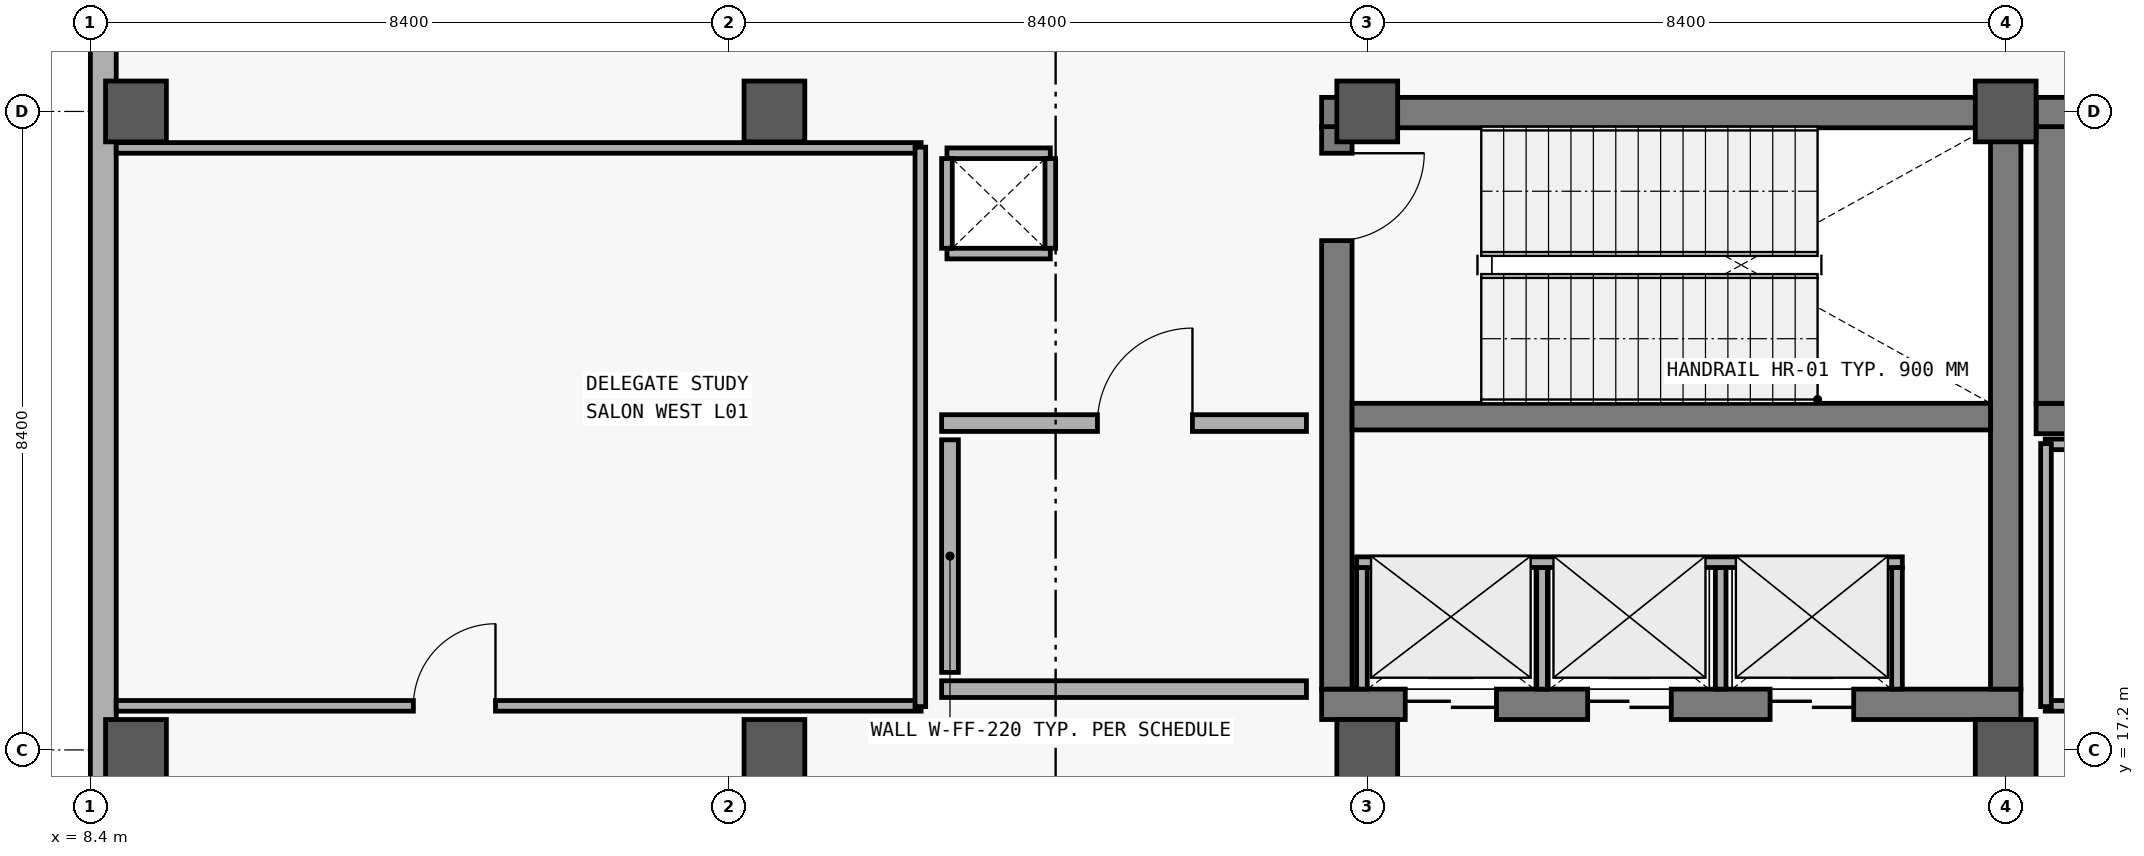
"""IFC4 building model, lengths in metres.
Left out: names, types, materials, properties, quantities, classifications, styles, units other than length and angle.
Written with IfcOpenShell. Run it as: python <this file> out.ifc"""

import sys

from ifc_helpers import new_model, si_unit, direction, frame, frame_2d, origin, origin_2d, place, context, subcontext, project, spatial, rectangle, extrude, element, fill, save


model = new_model("IFC4")
c1 = context("Model", 3, precision=1e-05, world=origin(), true_north=direction((0.0, 1.0)))
c2 = subcontext(c1, "Body", "Model", "MODEL_VIEW")
j1 = project(units=[si_unit("LENGTHUNIT", "METRE"), si_unit("PLANEANGLEUNIT", "RADIAN")], contexts=[c1])
p1 = place(None, origin())
s1 = spatial("IfcSite", under=j1, at=p1, CompositionType="ELEMENT")
p2 = place(p1, origin())
s2 = spatial("IfcBuilding", under=s1, at=p2, CompositionType="ELEMENT")
p3 = place(p2, frame((0.0, 0.0, 5.4)))
s3 = spatial("IfcBuildingStorey", under=s2, at=p3, CompositionType="ELEMENT", Elevation=5.4)
for number, where, z_axis, x_axis in (
    (1, (9.0, 17.2, 0.0), (0.0, 0.0, 1.0), (1.0, 0.0, 0.0)),
    (2, (9.0, 25.6, 0.0), (0.0, 0.0, 1.0), (1.0, 0.0, 0.0)),
    (3, (17.4, 17.2, 0.0), (0.0, 0.0, 1.0), (1.0, 0.0, 0.0)),
    (4, (17.4, 25.6, 0.0), (0.0, 0.0, 1.0), (1.0, 0.0, 0.0)),
    (5, (25.2, 17.2, 0.0), (0.0, 0.0, 1.0), (1.0, 0.0, 0.0)),
    (6, (25.2, 25.6, 0.0), (0.0, 0.0, 1.0), (1.0, 0.0, 0.0)),
    (7, (33.6, 17.2, 0.0), (0.0, 0.0, 1.0), (1.0, 0.0, 0.0)),
    (8, (33.6, 25.6, 0.0), (0.0, 0.0, 1.0), (1.0, 0.0, 0.0)),
):
    element("IfcColumn", number, at=place(p3, frame(where, z_axis=z_axis, x_axis=x_axis)), inside=s3, PredefinedType="COLUMN", context=c2, shape_type="SweptSolid", body=[
        extrude(rectangle(XDim=0.8, YDim=0.8, at=origin_2d()), origin(), (0.0, 0.0, 1.0), 5.4),
    ])
p4 = place(p3, frame((8.57, 6.0, 0.0), z_axis=(0.0, 0.0, 1.0), x_axis=(0.0, 1.0, 0.0)))
e9 = element("IfcWall", 9, at=p4, inside=s3, PredefinedType="SOLIDWALL", context=c2, shape_type="SweptSolid", body=[
    extrude(rectangle(XDim=28.0, YDim=0.34, at=frame_2d((14.0, 0.0))), origin(), (0.0, 0.0, 1.0), 5.1),
])
p5 = place(p4, frame((4.5, 0.0, 0.95)))
e10 = element("IfcOpeningElement", 10, at=p5, cuts=e9, PredefinedType="OPENING", context=c2, shape_type="SweptSolid", body=[
    extrude(rectangle(XDim=1.6, YDim=1.6, at=frame_2d((0.8, 0.8))), frame((0.0, 0.18, 0.0), z_axis=(0.0, -1.0, 0.0), x_axis=(1.0, 0.0, 0.0)), (0.0, 0.0, 1.0), 0.36),
])
p6 = place(p3, frame((24.6, 17.8, 0.0), z_axis=(0.0, 0.0, 1.0), x_axis=(1.0, 0.0, 0.0)))
e11 = element("IfcWall", 11, at=p6, inside=s3, PredefinedType="SHEAR", context=c2, shape_type="SweptSolid", body=[
    extrude(rectangle(XDim=9.2, YDim=0.4, at=frame_2d((4.6, 0.0))), origin(), (0.0, 0.0, 1.0), 5.08),
])
p7 = place(p6, frame((1.1, 0.0, 0.0)))
e12 = element("IfcOpeningElement", 12, at=p7, cuts=e11, PredefinedType="OPENING", context=c2, shape_type="SweptSolid", body=[
    extrude(rectangle(XDim=1.2, YDim=2.2, at=frame_2d((0.6, 1.1))), frame((0.0, 0.21, 0.0), z_axis=(0.0, -1.0, 0.0), x_axis=(1.0, 0.0, 0.0)), (0.0, 0.0, 1.0), 0.42),
])
p8 = place(p6, frame((3.5, 0.0, 0.0)))
e13 = element("IfcOpeningElement", 13, at=p8, cuts=e11, PredefinedType="OPENING", context=c2, shape_type="SweptSolid", body=[
    extrude(rectangle(XDim=1.1, YDim=2.2, at=frame_2d((0.55, 1.1))), frame((0.0, 0.21, 0.0), z_axis=(0.0, -1.0, 0.0), x_axis=(1.0, 0.0, 0.0)), (0.0, 0.0, 1.0), 0.42),
])
p9 = place(p6, frame((5.9, 0.0, 0.0)))
e14 = element("IfcOpeningElement", 14, at=p9, cuts=e11, PredefinedType="OPENING", context=c2, shape_type="SweptSolid", body=[
    extrude(rectangle(XDim=1.1, YDim=2.2, at=frame_2d((0.55, 1.1))), frame((0.0, 0.21, 0.0), z_axis=(0.0, -1.0, 0.0), x_axis=(1.0, 0.0, 0.0)), (0.0, 0.0, 1.0), 0.42),
])
p10 = place(p3, frame((33.8, 25.585, 0.0), z_axis=(0.0, 0.0, 1.0), x_axis=(-1.0, 0.0, 0.0)))
e15 = element("IfcWall", 15, at=p10, inside=s3, PredefinedType="SHEAR", context=c2, shape_type="SweptSolid", body=[
    extrude(rectangle(XDim=9.2, YDim=0.4, at=frame_2d((4.6, 0.0))), origin(), (0.0, 0.0, 1.0), 5.08),
])
p11 = place(p3, frame((24.8, 25.4, 0.0), z_axis=(0.0, 0.0, 1.0), x_axis=(0.0, -1.0, 0.0)))
e16 = element("IfcWall", 16, at=p11, inside=s3, PredefinedType="SHEAR", context=c2, shape_type="SweptSolid", body=[
    extrude(rectangle(XDim=7.4, YDim=0.4, at=frame_2d((3.7, 0.0))), origin(), (0.0, 0.0, 1.0), 5.08),
])
p12 = place(p11, frame((0.35, 0.0, 0.0)))
e17 = element("IfcOpeningElement", 17, at=p12, cuts=e16, PredefinedType="OPENING", context=c2, shape_type="SweptSolid", body=[
    extrude(rectangle(XDim=1.15, YDim=2.2, at=frame_2d((0.575, 1.1))), frame((0.0, 0.21, 0.0), z_axis=(0.0, -1.0, 0.0), x_axis=(1.0, 0.0, 0.0)), (0.0, 0.0, 1.0), 0.42),
])
p13 = place(p3, frame((33.6, 18.0, 0.0), z_axis=(0.0, 0.0, 1.0), x_axis=(0.0, 1.0, 0.0)))
e18 = element("IfcWall", 18, at=p13, inside=s3, PredefinedType="SHEAR", context=c2, shape_type="SweptSolid", body=[
    extrude(rectangle(XDim=7.4, YDim=0.4, at=frame_2d((3.7, 0.0))), origin(), (0.0, 0.0, 1.0), 5.08),
])
p14 = place(p3, frame((25.0, 21.585, 0.0), z_axis=(0.0, 0.0, 1.0), x_axis=(1.0, 0.0, 0.0)))
e19 = element("IfcWall", 19, at=p14, inside=s3, PredefinedType="SHEAR", context=c2, shape_type="SweptSolid", body=[
    extrude(rectangle(XDim=8.4, YDim=0.35, at=frame_2d((4.2, 0.0))), origin(), (0.0, 0.0, 1.0), 5.08),
])
for number, where, z_axis, x_axis in (
    (20, (25.13, 18.0, 0.0), (0.0, 0.0, 1.0), (0.0, 1.0, 0.0)),
    (21, (27.5, 18.0, 0.0), (0.0, 0.0, 1.0), (0.0, 1.0, 0.0)),
    (22, (29.85, 18.0, 0.0), (0.0, 0.0, 1.0), (0.0, 1.0, 0.0)),
    (23, (32.17, 18.0, 0.0), (0.0, 0.0, 1.0), (0.0, 1.0, 0.0)),
):
    element("IfcWall", number, at=place(p3, frame(where, z_axis=z_axis, x_axis=x_axis)), inside=s3, PredefinedType="PARTITIONING", context=c2, shape_type="SweptSolid", body=[
        extrude(rectangle(XDim=1.6, YDim=0.14, at=frame_2d((0.8, 0.0))), origin(), (0.0, 0.0, 1.0), 4.23),
    ])
p15 = place(p3, frame((25.06, 19.67, 0.0), z_axis=(0.0, 0.0, 1.0), x_axis=(1.0, 0.0, 0.0)))
e24 = element("IfcWall", 24, at=p15, inside=s3, PredefinedType="PARTITIONING", context=c2, shape_type="SweptSolid", body=[
    extrude(rectangle(XDim=7.18, YDim=0.14, at=frame_2d((3.59, 0.0))), origin(), (0.0, 0.0, 1.0), 4.23),
])
p16 = place(p3, frame((19.6, 18.0, 0.0), z_axis=(0.0, 0.0, 1.0), x_axis=(1.0, 0.0, 0.0)))
e25 = element("IfcWall", 25, at=p16, inside=s3, PredefinedType="SOLIDWALL", context=c2, shape_type="SweptSolid", body=[
    extrude(rectangle(XDim=4.8, YDim=0.22, at=frame_2d((2.4, 0.0))), origin(), (0.0, 0.0, 1.0), 4.23),
])
p17 = place(p3, frame((19.6, 21.5, 0.0), z_axis=(0.0, 0.0, 1.0), x_axis=(1.0, 0.0, 0.0)))
e26 = element("IfcWall", 26, at=p17, inside=s3, PredefinedType="SOLIDWALL", context=c2, shape_type="SweptSolid", body=[
    extrude(rectangle(XDim=4.8, YDim=0.22, at=frame_2d((2.4, 0.0))), origin(), (0.0, 0.0, 1.0), 4.23),
])
p18 = place(p17, frame((2.05, 0.0, 0.0)))
e27 = element("IfcOpeningElement", 27, at=p18, cuts=e26, PredefinedType="OPENING", context=c2, shape_type="SweptSolid", body=[
    extrude(rectangle(XDim=1.25, YDim=2.2, at=frame_2d((0.625, 1.1))), frame((0.0, 0.12, 0.0), z_axis=(0.0, -1.0, 0.0), x_axis=(1.0, 0.0, 0.0)), (0.0, 0.0, 1.0), 0.24),
])
p19 = place(p3, frame((19.71, 18.22, 0.0), z_axis=(0.0, 0.0, 1.0), x_axis=(0.0, 1.0, 0.0)))
e28 = element("IfcWall", 28, at=p19, inside=s3, PredefinedType="SOLIDWALL", context=c2, shape_type="SweptSolid", body=[
    extrude(rectangle(XDim=3.06, YDim=0.22, at=frame_2d((1.53, 0.0))), origin(), (0.0, 0.0, 1.0), 4.23),
])
for number, where, z_axis, x_axis in (
    (29, (34.0, 21.56, 0.0), (0.0, 0.0, 1.0), (1.0, 0.0, 0.0)),
    (30, (43.1, 25.585, 0.0), (0.0, 0.0, 1.0), (-1.0, 0.0, 0.0)),
):
    element("IfcWall", number, at=place(p3, frame(where, z_axis=z_axis, x_axis=x_axis)), inside=s3, PredefinedType="SHEAR", context=c2, shape_type="SweptSolid", body=[
        extrude(rectangle(XDim=9.1, YDim=0.4, at=frame_2d((4.55, 0.0))), origin(), (0.0, 0.0, 1.0), 5.08),
    ])
p20 = place(p3, frame((34.2, 25.4, 0.0), z_axis=(0.0, 0.0, 1.0), x_axis=(0.0, -1.0, 0.0)))
e31 = element("IfcWall", 31, at=p20, inside=s3, PredefinedType="SHEAR", context=c2, shape_type="SweptSolid", body=[
    extrude(rectangle(XDim=3.64, YDim=0.4, at=frame_2d((1.82, 0.0))), origin(), (0.0, 0.0, 1.0), 5.08),
])
p21 = place(p3, frame((8.74, 17.78, 0.0), z_axis=(0.0, 0.0, 1.0), x_axis=(1.0, 0.0, 0.0)))
e32 = element("IfcWall", 32, at=p21, inside=s3, PredefinedType="PARTITIONING", context=c2, shape_type="SweptSolid", body=[
    extrude(rectangle(XDim=10.59, YDim=0.14, at=frame_2d((5.295, 0.0))), origin(), (0.0, 0.0, 1.0), 4.18),
])
p22 = place(p21, frame((3.91, 0.0, 0.0)))
e33 = element("IfcOpeningElement", 33, at=p22, cuts=e32, PredefinedType="OPENING", context=c2, shape_type="SweptSolid", body=[
    extrude(rectangle(XDim=1.08, YDim=2.25, at=frame_2d((0.54, 1.125))), frame((0.0, 0.08, 0.0), z_axis=(0.0, -1.0, 0.0), x_axis=(1.0, 0.0, 0.0)), (0.0, 0.0, 1.0), 0.16),
])
for number, where, z_axis, x_axis in (
    (34, (34.12, 17.78, 0.0), (0.0, 0.0, 1.0), (1.0, 0.0, 0.0)),
    (35, (34.12, 21.22, 0.0), (0.0, 0.0, 1.0), (1.0, 0.0, 0.0)),
):
    element("IfcWall", number, at=place(p3, frame(where, z_axis=z_axis, x_axis=x_axis)), inside=s3, PredefinedType="PARTITIONING", context=c2, shape_type="SweptSolid", body=[
        extrude(rectangle(XDim=10.76, YDim=0.14, at=frame_2d((5.38, 0.0))), origin(), (0.0, 0.0, 1.0), 4.18),
    ])
p23 = place(p3, frame((34.13, 17.77, 0.0), z_axis=(0.0, 0.0, 1.0), x_axis=(0.0, 1.0, 0.0)))
e36 = element("IfcWall", 36, at=p23, inside=s3, PredefinedType="PARTITIONING", context=c2, shape_type="SweptSolid", body=[
    extrude(rectangle(XDim=3.46, YDim=0.14, at=frame_2d((1.73, 0.0))), origin(), (0.0, 0.0, 1.0), 4.18),
])
p24 = place(p3, frame((8.74, 25.12, 0.0), z_axis=(0.0, 0.0, 1.0), x_axis=(1.0, 0.0, 0.0)))
e37 = element("IfcWall", 37, at=p24, inside=s3, PredefinedType="PARTITIONING", context=c2, shape_type="SweptSolid", body=[
    extrude(rectangle(XDim=10.59, YDim=0.14, at=frame_2d((5.295, 0.0))), origin(), (0.0, 0.0, 1.0), 4.18),
])
p25 = place(p3, frame((19.32, 17.77, 0.0), z_axis=(0.0, 0.0, 1.0), x_axis=(0.0, 1.0, 0.0)))
e38 = element("IfcWall", 38, at=p25, inside=s3, PredefinedType="PARTITIONING", context=c2, shape_type="SweptSolid", body=[
    extrude(rectangle(XDim=7.36, YDim=0.14, at=frame_2d((3.68, 0.0))), origin(), (0.0, 0.0, 1.0), 4.18),
])
for number, where, z_axis, x_axis in (
    (39, (19.67, 23.73, 0.0), (0.0, 0.0, 1.0), (1.0, 0.0, 0.0)),
    (40, (21.03, 25.05, 0.0), (0.0, 0.0, 1.0), (-1.0, 0.0, 0.0)),
):
    element("IfcWall", number, at=place(p3, frame(where, z_axis=z_axis, x_axis=x_axis)), inside=s3, PredefinedType="PARTITIONING", context=c2, shape_type="SweptSolid", body=[
        extrude(rectangle(XDim=1.36, YDim=0.14, at=frame_2d((0.68, 0.0))), origin(), (0.0, 0.0, 1.0), 4.2),
    ])
for number, where, z_axis, x_axis in (
    (41, (19.67, 24.98, 0.0), (0.0, 0.0, 1.0), (0.0, -1.0, 0.0)),
    (42, (21.03, 23.8, 0.0), (0.0, 0.0, 1.0), (0.0, 1.0, 0.0)),
):
    element("IfcWall", number, at=place(p3, frame(where, z_axis=z_axis, x_axis=x_axis)), inside=s3, PredefinedType="PARTITIONING", context=c2, shape_type="SweptSolid", body=[
        extrude(rectangle(XDim=1.18, YDim=0.14, at=frame_2d((0.59, 0.0))), origin(), (0.0, 0.0, 1.0), 4.2),
    ])
p26 = place(p12, origin())
e43 = element("IfcDoor", 43, at=p26, inside=s3, OperationType="SINGLE_SWING_LEFT", PredefinedType="DOOR", context=c2, shape_type="SweptSolid", body=[
    extrude(rectangle(XDim=1.15, YDim=2.2, at=frame_2d((0.575, 1.1))), frame((0.0, 0.025, 0.0), z_axis=(0.0, -1.0, 0.0), x_axis=(1.0, 0.0, 0.0)), (0.0, 0.0, 1.0), 0.05),
])
fill(e17, e43)
p27 = place(p7, origin())
e44 = element("IfcDoor", 44, at=p27, inside=s3, OperationType="DOUBLE_DOOR_SLIDING", PredefinedType="DOOR", context=c2, shape_type="SweptSolid", body=[
    extrude(rectangle(XDim=1.2, YDim=2.2, at=frame_2d((0.6, 1.1))), frame((0.0, 0.025, 0.0), z_axis=(0.0, -1.0, 0.0), x_axis=(1.0, 0.0, 0.0)), (0.0, 0.0, 1.0), 0.05),
])
fill(e12, e44)
p28 = place(p8, origin())
e45 = element("IfcDoor", 45, at=p28, inside=s3, OperationType="DOUBLE_DOOR_SLIDING", PredefinedType="DOOR", context=c2, shape_type="SweptSolid", body=[
    extrude(rectangle(XDim=1.1, YDim=2.2, at=frame_2d((0.55, 1.1))), frame((0.0, 0.025, 0.0), z_axis=(0.0, -1.0, 0.0), x_axis=(1.0, 0.0, 0.0)), (0.0, 0.0, 1.0), 0.05),
])
fill(e13, e45)
p29 = place(p9, origin())
e46 = element("IfcDoor", 46, at=p29, inside=s3, OperationType="DOUBLE_DOOR_SLIDING", PredefinedType="DOOR", context=c2, shape_type="SweptSolid", body=[
    extrude(rectangle(XDim=1.1, YDim=2.2, at=frame_2d((0.55, 1.1))), frame((0.0, 0.025, 0.0), z_axis=(0.0, -1.0, 0.0), x_axis=(1.0, 0.0, 0.0)), (0.0, 0.0, 1.0), 0.05),
])
fill(e14, e46)
p30 = place(p18, origin())
e47 = element("IfcDoor", 47, at=p30, inside=s3, OperationType="SINGLE_SWING_RIGHT", PredefinedType="DOOR", context=c2, shape_type="SweptSolid", body=[
    extrude(rectangle(XDim=1.25, YDim=2.2, at=frame_2d((0.625, 1.1))), frame((0.0, 0.025, 0.0), z_axis=(0.0, -1.0, 0.0), x_axis=(1.0, 0.0, 0.0)), (0.0, 0.0, 1.0), 0.05),
])
fill(e27, e47)
p31 = place(p22, origin())
e48 = element("IfcDoor", 48, at=p31, inside=s3, OperationType="SINGLE_SWING_RIGHT", PredefinedType="DOOR", context=c2, shape_type="SweptSolid", body=[
    extrude(rectangle(XDim=1.08, YDim=2.25, at=frame_2d((0.54, 1.125))), frame((0.0, 0.025, 0.0), z_axis=(0.0, -1.0, 0.0), x_axis=(1.0, 0.0, 0.0)), (0.0, 0.0, 1.0), 0.05),
])
fill(e33, e48)
save(model, sys.argv[1])
